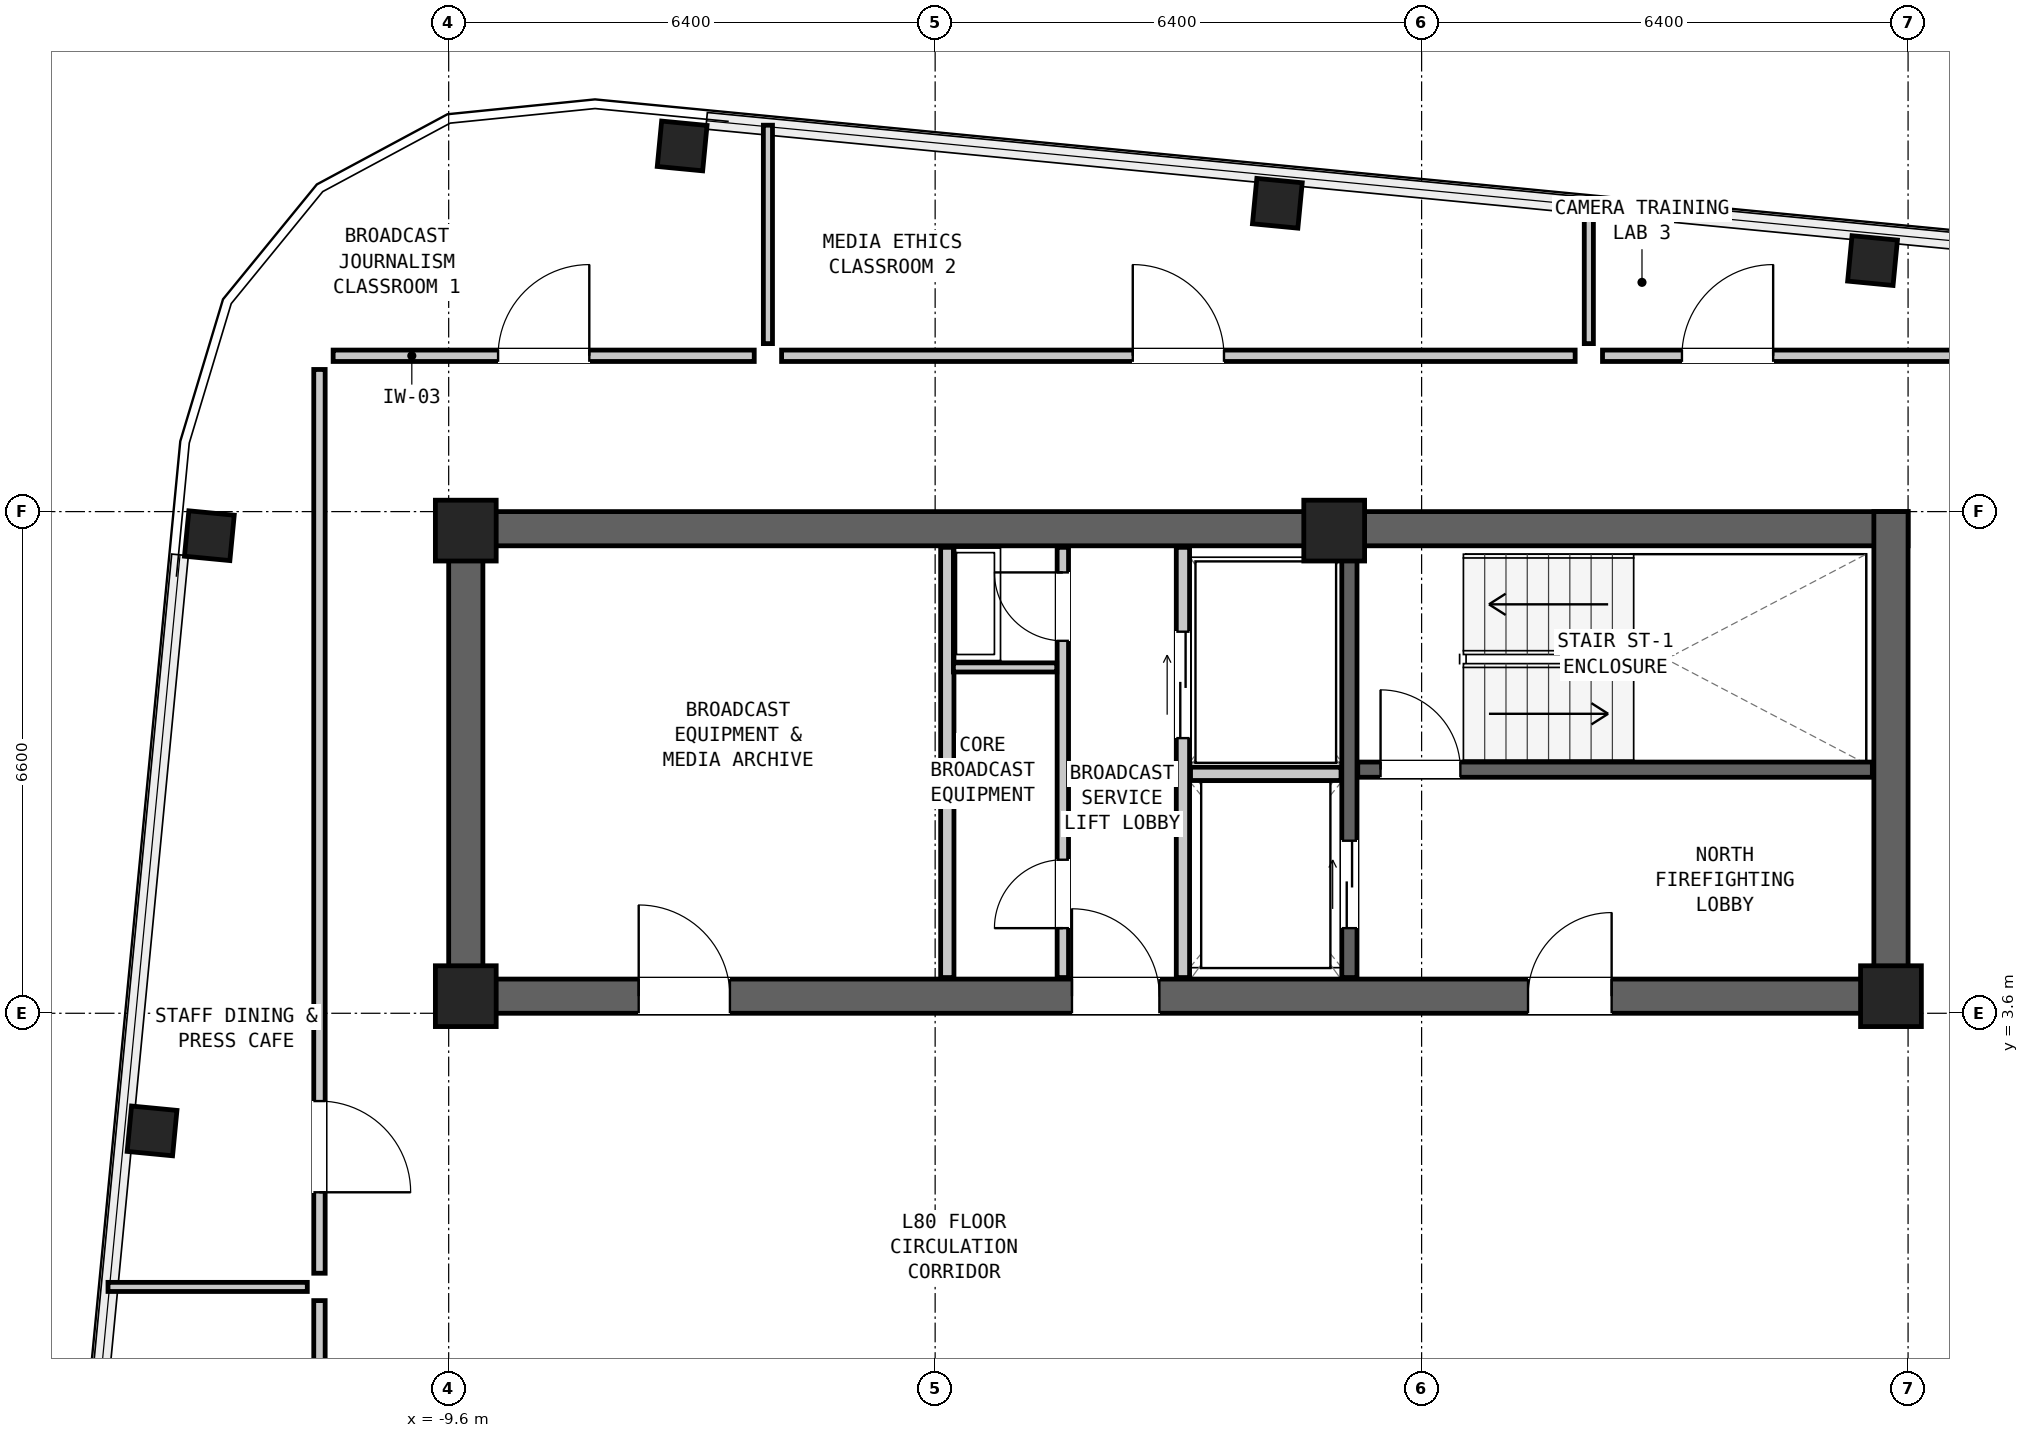
"""IFC4 building model, lengths in metres.
Left out: names, types, materials, properties, quantities, classifications, styles, units other than length and angle.
Written with IfcOpenShell. Run it as: python <this file> out.ifc"""

import sys

from ifc_helpers import new_model, si_unit, direction, frame, frame_2d, origin, origin_2d, place, context, subcontext, project, spatial, rectangle, hollow_rectangle, extrude, element, fill, save


model = new_model("IFC4")
c1 = context("Model", 3, precision=1e-05, world=origin(), true_north=direction((0.0, 1.0)))
c2 = subcontext(c1, "Body", "Model", "MODEL_VIEW")
j1 = project(units=[si_unit("LENGTHUNIT", "METRE"), si_unit("PLANEANGLEUNIT", "RADIAN")], contexts=[c1])
p1 = place(None, origin())
s1 = spatial("IfcSite", under=j1, at=p1, CompositionType="ELEMENT")
p2 = place(p1, origin())
s2 = spatial("IfcBuilding", under=s1, at=p2, CompositionType="ELEMENT")
p3 = place(p2, frame((0.0, 0.0, 270.3)))
s3 = spatial("IfcBuildingStorey", under=s2, at=p3, CompositionType="ELEMENT", Elevation=270.3)
p4 = place(p3, frame((-9.6, 9.975, 0.0), z_axis=(0.0, 0.0, 1.0), x_axis=(1.0, 0.0, 0.0)))
e1 = element("IfcWall", 1, at=p4, inside=s3, PredefinedType="SHEAR", context=c2, shape_type="SweptSolid", body=[
    extrude(rectangle(XDim=19.2, YDim=0.45, at=frame_2d((9.6, 0.0))), origin(), (0.0, 0.0, 1.0), 3.05),
])
p5 = place(p3, frame((-9.6, 3.825, 0.0), z_axis=(0.0, 0.0, 1.0), x_axis=(1.0, 0.0, 0.0)))
e2 = element("IfcWall", 2, at=p5, inside=s3, PredefinedType="SHEAR", context=c2, shape_type="SweptSolid", body=[
    extrude(rectangle(XDim=19.2, YDim=0.45, at=frame_2d((9.6, 0.0))), origin(), (0.0, 0.0, 1.0), 3.05),
])
p6 = place(p5, frame((14.2, 0.0, 0.0)))
e3 = element("IfcOpeningElement", 3, at=p6, cuts=e2, PredefinedType="OPENING", context=c2, shape_type="SweptSolid", body=[
    extrude(rectangle(XDim=1.1, YDim=2.08, at=frame_2d((0.55, 1.04))), frame((0.0, 0.237, 0.0), z_axis=(0.0, -1.0, 0.0), x_axis=(1.0, 0.0, 0.0)), (0.0, 0.0, 1.0), 0.474),
])
p7 = place(p5, frame((8.2, 0.0, 0.0)))
e4 = element("IfcOpeningElement", 4, at=p7, cuts=e2, PredefinedType="OPENING", context=c2, shape_type="SweptSolid", body=[
    extrude(rectangle(XDim=1.15, YDim=2.1, at=frame_2d((0.575, 1.05))), frame((0.0, 0.237, 0.0), z_axis=(0.0, -1.0, 0.0), x_axis=(1.0, 0.0, 0.0)), (0.0, 0.0, 1.0), 0.474),
])
p8 = place(p5, frame((2.5, 0.0, 0.0)))
e5 = element("IfcOpeningElement", 5, at=p8, cuts=e2, PredefinedType="OPENING", context=c2, shape_type="SweptSolid", body=[
    extrude(rectangle(XDim=1.2, YDim=2.1, at=frame_2d((0.6, 1.05))), frame((0.0, 0.237, 0.0), z_axis=(0.0, -1.0, 0.0), x_axis=(1.0, 0.0, 0.0)), (0.0, 0.0, 1.0), 0.474),
])
for number, where, z_axis, x_axis in (
    (6, (-9.375, 3.6, 0.0), (0.0, 0.0, 1.0), (0.0, 1.0, 0.0)),
    (7, (9.375, 3.6, 0.0), (0.0, 0.0, 1.0), (0.0, 1.0, 0.0)),
):
    element("IfcWall", number, at=place(p3, frame(where, z_axis=z_axis, x_axis=x_axis)), inside=s3, PredefinedType="SHEAR", context=c2, shape_type="SweptSolid", body=[
        extrude(rectangle(XDim=6.6, YDim=0.45, at=frame_2d((3.3, 0.0))), origin(), (0.0, 0.0, 1.0), 3.05),
    ])
for number, where, z_axis, x_axis in (
    (8, (9.133, 13.502, 0.0), (0.0, 0.0, 1.0), (0.995, -0.096, 0.0)),
    (9, (1.302, 14.256, 0.0), (0.0, 0.0, 1.0), (0.995, -0.096, 0.0)),
    (10, (-6.528, 15.01, 0.0), (0.0, 0.0, 1.0), (0.995, -0.096, 0.0)),
    (11, (-12.749, 9.883, 0.0), (0.0, 0.0, 1.0), (0.096, 0.995, 0.0)),
    (12, (-13.502, 2.052, 0.0), (0.0, 0.0, 1.0), (0.096, 0.995, 0.0)),
):
    element("IfcColumn", number, at=place(p3, frame(where, z_axis=z_axis, x_axis=x_axis)), inside=s3, PredefinedType="COLUMN", context=c2, shape_type="SweptSolid", body=[
        extrude(hollow_rectangle(XDim=0.6, YDim=0.6, WallThickness=0.04, at=origin_2d()), origin(), (0.0, 0.0, 1.0), 3.05),
    ])
for number, where, z_axis, x_axis in (
    (13, (-9.375, 9.95, 0.0), (0.0, 0.0, 1.0), (1.0, 0.0, 0.0)),
    (14, (2.05, 9.95, 0.0), (0.0, 0.0, 1.0), (1.0, 0.0, 0.0)),
    (15, (-9.375, 3.825, 0.0), (0.0, 0.0, 1.0), (1.0, 0.0, 0.0)),
    (16, (9.375, 3.825, 0.0), (0.0, 0.0, 1.0), (1.0, 0.0, 0.0)),
):
    element("IfcColumn", number, at=place(p3, frame(where, z_axis=z_axis, x_axis=x_axis)), inside=s3, PredefinedType="COLUMN", context=c2, shape_type="SweptSolid", body=[
        extrude(rectangle(XDim=0.8, YDim=0.8, at=origin_2d()), origin(), (0.0, 0.0, 1.0), 3.05),
    ])
p9 = place(p3, frame((2.36, 6.805, 0.0), z_axis=(0.0, 0.0, 1.0), x_axis=(1.0, 0.0, 0.0)))
e17 = element("IfcWall", 17, at=p9, inside=s3, PredefinedType="SHEAR", context=c2, shape_type="SweptSolid", body=[
    extrude(rectangle(XDim=6.77, YDim=0.2, at=frame_2d((3.385, 0.0))), origin(), (0.0, 0.0, 1.0), 2.86),
])
p10 = place(p9, frame((0.3, 0.0, 0.0)))
e18 = element("IfcOpeningElement", 18, at=p10, cuts=e17, PredefinedType="OPENING", context=c2, shape_type="SweptSolid", body=[
    extrude(rectangle(XDim=1.05, YDim=2.08, at=frame_2d((0.525, 1.04))), frame((0.0, 0.112, 0.0), z_axis=(0.0, -1.0, 0.0), x_axis=(1.0, 0.0, 0.0)), (0.0, 0.0, 1.0), 0.224),
])
p11 = place(p3, frame((2.25, 4.07, 0.0), z_axis=(0.0, 0.0, 1.0), x_axis=(0.0, 1.0, 0.0)))
e19 = element("IfcWall", 19, at=p11, inside=s3, PredefinedType="SHEAR", context=c2, shape_type="SweptSolid", body=[
    extrude(rectangle(XDim=5.66, YDim=0.2, at=frame_2d((2.83, 0.0))), origin(), (0.0, 0.0, 1.0), 2.86),
])
p12 = place(p11, frame((0.65, 0.0, 0.0)))
e20 = element("IfcOpeningElement", 20, at=p12, cuts=e19, PredefinedType="OPENING", context=c2, shape_type="SweptSolid", body=[
    extrude(rectangle(XDim=1.15, YDim=2.08, at=frame_2d((0.575, 1.04))), frame((0.0, 0.112, 0.0), z_axis=(0.0, -1.0, 0.0), x_axis=(1.0, 0.0, 0.0)), (0.0, 0.0, 1.0), 0.224),
])
p13 = place(p3, frame((0.06, 4.07, 0.0), z_axis=(0.0, 0.0, 1.0), x_axis=(0.0, 1.0, 0.0)))
e21 = element("IfcWall", 21, at=p13, inside=s3, PredefinedType="PARTITIONING", context=c2, shape_type="SweptSolid", body=[
    extrude(rectangle(XDim=5.66, YDim=0.175, at=frame_2d((2.83, 0.0))), origin(), (0.0, 0.0, 1.0), 2.86),
])
p14 = place(p13, frame((3.15, 0.0, 0.0)))
e22 = element("IfcOpeningElement", 22, at=p14, cuts=e21, PredefinedType="OPENING", context=c2, shape_type="SweptSolid", body=[
    extrude(rectangle(XDim=1.4, YDim=2.12, at=frame_2d((0.7, 1.06))), frame((0.0, 0.1, 0.0), z_axis=(0.0, -1.0, 0.0), x_axis=(1.0, 0.0, 0.0)), (0.0, 0.0, 1.0), 0.199),
])
p15 = place(p3, frame((0.16, 6.75, 0.0), z_axis=(0.0, 0.0, 1.0), x_axis=(1.0, 0.0, 0.0)))
e23 = element("IfcWall", 23, at=p15, inside=s3, PredefinedType="PARTITIONING", context=c2, shape_type="SweptSolid", body=[
    extrude(rectangle(XDim=1.98, YDim=0.175, at=frame_2d((0.99, 0.0))), origin(), (0.0, 0.0, 1.0), 2.86),
])
p16 = place(p3, frame((-3.04, 4.07, 0.0), z_axis=(0.0, 0.0, 1.0), x_axis=(0.0, 1.0, 0.0)))
e24 = element("IfcWall", 24, at=p16, inside=s3, PredefinedType="PARTITIONING", context=c2, shape_type="SweptSolid", body=[
    extrude(rectangle(XDim=5.66, YDim=0.175, at=frame_2d((2.83, 0.0))), origin(), (0.0, 0.0, 1.0), 2.86),
])
p17 = place(p3, frame((-1.52, 4.07, 0.0), z_axis=(0.0, 0.0, 1.0), x_axis=(0.0, 1.0, 0.0)))
e25 = element("IfcWall", 25, at=p17, inside=s3, PredefinedType="PARTITIONING", context=c2, shape_type="SweptSolid", body=[
    extrude(rectangle(XDim=5.66, YDim=0.15, at=frame_2d((2.83, 0.0))), origin(), (0.0, 0.0, 1.0), 2.86),
])
p18 = place(p17, frame((4.43, 0.0, 0.0)))
e26 = element("IfcOpeningElement", 26, at=p18, cuts=e25, PredefinedType="OPENING", context=c2, shape_type="SweptSolid", body=[
    extrude(rectangle(XDim=0.9, YDim=2.05, at=frame_2d((0.45, 1.025))), frame((0.0, 0.087, 0.0), z_axis=(0.0, -1.0, 0.0), x_axis=(1.0, 0.0, 0.0)), (0.0, 0.0, 1.0), 0.174),
])
p19 = place(p17, frame((0.65, 0.0, 0.0)))
e27 = element("IfcOpeningElement", 27, at=p19, cuts=e25, PredefinedType="OPENING", context=c2, shape_type="SweptSolid", body=[
    extrude(rectangle(XDim=0.9, YDim=2.05, at=frame_2d((0.45, 1.025))), frame((0.0, 0.087, 0.0), z_axis=(0.0, -1.0, 0.0), x_axis=(1.0, 0.0, 0.0)), (0.0, 0.0, 1.0), 0.174),
])
p20 = place(p3, frame((-2.96, 8.15, 0.0), z_axis=(0.0, 0.0, 1.0), x_axis=(1.0, 0.0, 0.0)))
e28 = element("IfcWall", 28, at=p20, inside=s3, PredefinedType="PARTITIONING", context=c2, shape_type="SweptSolid", body=[
    extrude(rectangle(XDim=1.36, YDim=0.12, at=frame_2d((0.68, 0.0))), origin(), (0.0, 0.0, 1.0), 2.86),
])
p21 = place(p3, frame((-5.4, 12.41, 0.0), z_axis=(0.0, 0.0, 1.0), x_axis=(0.0, 1.0, 0.0)))
e29 = element("IfcWall", 29, at=p21, inside=s3, PredefinedType="PARTITIONING", context=c2, shape_type="SweptSolid", body=[
    extrude(rectangle(XDim=2.874, YDim=0.12, at=frame_2d((1.437, 0.0))), origin(), (0.0, 0.0, 1.0), 2.86),
])
p22 = place(p3, frame((5.4, 12.41, 0.0), z_axis=(0.0, 0.0, 1.0), x_axis=(0.0, 1.0, 0.0)))
e30 = element("IfcWall", 30, at=p22, inside=s3, PredefinedType="PARTITIONING", context=c2, shape_type="SweptSolid", body=[
    extrude(rectangle(XDim=1.834, YDim=0.12, at=frame_2d((0.917, 0.0))), origin(), (0.0, 0.0, 1.0), 2.86),
])
p23 = place(p3, frame((-14.082, 0.0, 0.0), z_axis=(0.0, 0.0, 1.0), x_axis=(1.0, 0.0, 0.0)))
e31 = element("IfcWall", 31, at=p23, inside=s3, PredefinedType="PARTITIONING", context=c2, shape_type="SweptSolid", body=[
    extrude(rectangle(XDim=2.622, YDim=0.12, at=frame_2d((1.311, 0.0))), origin(), (0.0, 0.0, 1.0), 2.86),
])
p24 = place(p3, frame((-11.12, 12.25, 0.0), z_axis=(0.0, 0.0, 1.0), x_axis=(1.0, 0.0, 0.0)))
e32 = element("IfcWall", 32, at=p24, inside=s3, PredefinedType="PARTITIONING", context=c2, shape_type="SweptSolid", body=[
    extrude(rectangle(XDim=5.54, YDim=0.15, at=frame_2d((2.77, 0.0))), origin(), (0.0, 0.0, 1.0), 2.86),
])
p25 = place(p24, frame((2.17, 0.0, 0.0)))
e33 = element("IfcOpeningElement", 33, at=p25, cuts=e32, PredefinedType="OPENING", context=c2, shape_type="SweptSolid", body=[
    extrude(rectangle(XDim=1.2, YDim=2.1, at=frame_2d((0.6, 1.05))), frame((0.0, 0.087, 0.0), z_axis=(0.0, -1.0, 0.0), x_axis=(1.0, 0.0, 0.0)), (0.0, 0.0, 1.0), 0.174),
])
p26 = place(p3, frame((-5.22, 12.25, 0.0), z_axis=(0.0, 0.0, 1.0), x_axis=(1.0, 0.0, 0.0)))
e34 = element("IfcWall", 34, at=p26, inside=s3, PredefinedType="PARTITIONING", context=c2, shape_type="SweptSolid", body=[
    extrude(rectangle(XDim=10.44, YDim=0.15, at=frame_2d((5.22, 0.0))), origin(), (0.0, 0.0, 1.0), 2.86),
])
p27 = place(p26, frame((4.62, 0.0, 0.0)))
e35 = element("IfcOpeningElement", 35, at=p27, cuts=e34, PredefinedType="OPENING", context=c2, shape_type="SweptSolid", body=[
    extrude(rectangle(XDim=1.2, YDim=2.1, at=frame_2d((0.6, 1.05))), frame((0.0, 0.087, 0.0), z_axis=(0.0, -1.0, 0.0), x_axis=(1.0, 0.0, 0.0)), (0.0, 0.0, 1.0), 0.174),
])
p28 = place(p3, frame((5.58, 12.25, 0.0), z_axis=(0.0, 0.0, 1.0), x_axis=(1.0, 0.0, 0.0)))
e36 = element("IfcWall", 36, at=p28, inside=s3, PredefinedType="PARTITIONING", context=c2, shape_type="SweptSolid", body=[
    extrude(rectangle(XDim=5.89, YDim=0.15, at=frame_2d((2.945, 0.0))), origin(), (0.0, 0.0, 1.0), 2.86),
])
p29 = place(p28, frame((1.045, 0.0, 0.0)))
e37 = element("IfcOpeningElement", 37, at=p29, cuts=e36, PredefinedType="OPENING", context=c2, shape_type="SweptSolid", body=[
    extrude(rectangle(XDim=1.2, YDim=2.1, at=frame_2d((0.6, 1.05))), frame((0.0, 0.087, 0.0), z_axis=(0.0, -1.0, 0.0), x_axis=(1.0, 0.0, 0.0)), (0.0, 0.0, 1.0), 0.174),
])
p30 = place(p3, frame((-11.3, -0.18, 0.0), z_axis=(0.0, 0.0, 1.0), x_axis=(0.0, -1.0, 0.0)))
e38 = element("IfcWall", 38, at=p30, inside=s3, PredefinedType="PARTITIONING", context=c2, shape_type="SweptSolid", body=[
    extrude(rectangle(XDim=10.69, YDim=0.15, at=frame_2d((5.345, 0.0))), origin(), (0.0, 0.0, 1.0), 2.86),
])
p31 = place(p30, frame((4.745, 0.0, 0.0)))
e39 = element("IfcOpeningElement", 39, at=p31, cuts=e38, PredefinedType="OPENING", context=c2, shape_type="SweptSolid", body=[
    extrude(rectangle(XDim=1.2, YDim=2.1, at=frame_2d((0.6, 1.05))), frame((0.0, 0.087, 0.0), z_axis=(0.0, -1.0, 0.0), x_axis=(1.0, 0.0, 0.0)), (0.0, 0.0, 1.0), 0.174),
])
p32 = place(p3, frame((-11.3, 12.07, 0.0), z_axis=(0.0, 0.0, 1.0), x_axis=(0.0, -1.0, 0.0)))
e40 = element("IfcWall", 40, at=p32, inside=s3, PredefinedType="PARTITIONING", context=c2, shape_type="SweptSolid", body=[
    extrude(rectangle(XDim=11.89, YDim=0.15, at=frame_2d((5.945, 0.0))), origin(), (0.0, 0.0, 1.0), 2.86),
])
p33 = place(p32, frame((9.625, 0.0, 0.0)))
e41 = element("IfcOpeningElement", 41, at=p33, cuts=e40, PredefinedType="OPENING", context=c2, shape_type="SweptSolid", body=[
    extrude(rectangle(XDim=1.2, YDim=2.1, at=frame_2d((0.6, 1.05))), frame((0.0, 0.087, 0.0), z_axis=(0.0, -1.0, 0.0), x_axis=(1.0, 0.0, 0.0)), (0.0, 0.0, 1.0), 0.174),
])
p34 = place(p10, origin())
e42 = element("IfcDoor", 42, at=p34, inside=s3, OperationType="SINGLE_SWING_LEFT", PredefinedType="DOOR", context=c2, shape_type="SweptSolid", body=[
    extrude(rectangle(XDim=1.05, YDim=2.08, at=frame_2d((0.525, 1.04))), frame((0.0, 0.025, 0.0), z_axis=(0.0, -1.0, 0.0), x_axis=(1.0, 0.0, 0.0)), (0.0, 0.0, 1.0), 0.05),
])
fill(e18, e42)
p35 = place(p6, origin())
e43 = element("IfcDoor", 43, at=p35, inside=s3, OperationType="SINGLE_SWING_RIGHT", PredefinedType="DOOR", context=c2, shape_type="SweptSolid", body=[
    extrude(rectangle(XDim=1.1, YDim=2.08, at=frame_2d((0.55, 1.04))), frame((0.0, 0.025, 0.0), z_axis=(0.0, -1.0, 0.0), x_axis=(1.0, 0.0, 0.0)), (0.0, 0.0, 1.0), 0.05),
])
fill(e3, e43)
p36 = place(p12, origin())
e44 = element("IfcDoor", 44, at=p36, inside=s3, OperationType="DOUBLE_DOOR_SLIDING", PredefinedType="DOOR", context=c2, shape_type="SweptSolid", body=[
    extrude(rectangle(XDim=1.15, YDim=2.08, at=frame_2d((0.575, 1.04))), frame((0.0, 0.025, 0.0), z_axis=(0.0, -1.0, 0.0), x_axis=(1.0, 0.0, 0.0)), (0.0, 0.0, 1.0), 0.05),
])
fill(e20, e44)
p37 = place(p14, origin())
e45 = element("IfcDoor", 45, at=p37, inside=s3, OperationType="DOUBLE_DOOR_SLIDING", PredefinedType="DOOR", context=c2, shape_type="SweptSolid", body=[
    extrude(rectangle(XDim=1.4, YDim=2.12, at=frame_2d((0.7, 1.06))), frame((0.0, 0.025, 0.0), z_axis=(0.0, -1.0, 0.0), x_axis=(1.0, 0.0, 0.0)), (0.0, 0.0, 1.0), 0.05),
])
fill(e22, e45)
p38 = place(p7, origin())
e46 = element("IfcDoor", 46, at=p38, inside=s3, OperationType="SINGLE_SWING_LEFT", PredefinedType="DOOR", context=c2, shape_type="SweptSolid", body=[
    extrude(rectangle(XDim=1.15, YDim=2.1, at=frame_2d((0.575, 1.05))), frame((0.0, 0.025, 0.0), z_axis=(0.0, -1.0, 0.0), x_axis=(1.0, 0.0, 0.0)), (0.0, 0.0, 1.0), 0.05),
])
fill(e4, e46)
p39 = place(p18, origin())
e47 = element("IfcDoor", 47, at=p39, inside=s3, OperationType="SINGLE_SWING_RIGHT", PredefinedType="DOOR", context=c2, shape_type="SweptSolid", body=[
    extrude(rectangle(XDim=0.9, YDim=2.05, at=frame_2d((0.45, 1.025))), frame((0.0, 0.025, 0.0), z_axis=(0.0, -1.0, 0.0), x_axis=(1.0, 0.0, 0.0)), (0.0, 0.0, 1.0), 0.05),
])
fill(e26, e47)
p40 = place(p19, origin())
e48 = element("IfcDoor", 48, at=p40, inside=s3, OperationType="SINGLE_SWING_LEFT", PredefinedType="DOOR", context=c2, shape_type="SweptSolid", body=[
    extrude(rectangle(XDim=0.9, YDim=2.05, at=frame_2d((0.45, 1.025))), frame((0.0, 0.025, 0.0), z_axis=(0.0, -1.0, 0.0), x_axis=(1.0, 0.0, 0.0)), (0.0, 0.0, 1.0), 0.05),
])
fill(e27, e48)
p41 = place(p8, origin())
e49 = element("IfcDoor", 49, at=p41, inside=s3, OperationType="SINGLE_SWING_LEFT", PredefinedType="DOOR", context=c2, shape_type="SweptSolid", body=[
    extrude(rectangle(XDim=1.2, YDim=2.1, at=frame_2d((0.6, 1.05))), frame((0.0, 0.025, 0.0), z_axis=(0.0, -1.0, 0.0), x_axis=(1.0, 0.0, 0.0)), (0.0, 0.0, 1.0), 0.05),
])
fill(e5, e49)
p42 = place(p25, origin())
e50 = element("IfcDoor", 50, at=p42, inside=s3, OperationType="SINGLE_SWING_RIGHT", PredefinedType="DOOR", context=c2, shape_type="SweptSolid", body=[
    extrude(rectangle(XDim=1.2, YDim=2.1, at=frame_2d((0.6, 1.05))), frame((0.0, 0.025, 0.0), z_axis=(0.0, -1.0, 0.0), x_axis=(1.0, 0.0, 0.0)), (0.0, 0.0, 1.0), 0.05),
])
fill(e33, e50)
p43 = place(p27, origin())
e51 = element("IfcDoor", 51, at=p43, inside=s3, OperationType="SINGLE_SWING_LEFT", PredefinedType="DOOR", context=c2, shape_type="SweptSolid", body=[
    extrude(rectangle(XDim=1.2, YDim=2.1, at=frame_2d((0.6, 1.05))), frame((0.0, 0.025, 0.0), z_axis=(0.0, -1.0, 0.0), x_axis=(1.0, 0.0, 0.0)), (0.0, 0.0, 1.0), 0.05),
])
fill(e35, e51)
p44 = place(p29, origin())
e52 = element("IfcDoor", 52, at=p44, inside=s3, OperationType="SINGLE_SWING_RIGHT", PredefinedType="DOOR", context=c2, shape_type="SweptSolid", body=[
    extrude(rectangle(XDim=1.2, YDim=2.1, at=frame_2d((0.6, 1.05))), frame((0.0, 0.025, 0.0), z_axis=(0.0, -1.0, 0.0), x_axis=(1.0, 0.0, 0.0)), (0.0, 0.0, 1.0), 0.05),
])
fill(e37, e52)
p45 = place(p33, origin())
e53 = element("IfcDoor", 53, at=p45, inside=s3, OperationType="SINGLE_SWING_RIGHT", PredefinedType="DOOR", context=c2, shape_type="SweptSolid", body=[
    extrude(rectangle(XDim=1.2, YDim=2.1, at=frame_2d((0.6, 1.05))), frame((0.0, 0.025, 0.0), z_axis=(0.0, -1.0, 0.0), x_axis=(1.0, 0.0, 0.0)), (0.0, 0.0, 1.0), 0.05),
])
fill(e41, e53)
save(model, sys.argv[1])
